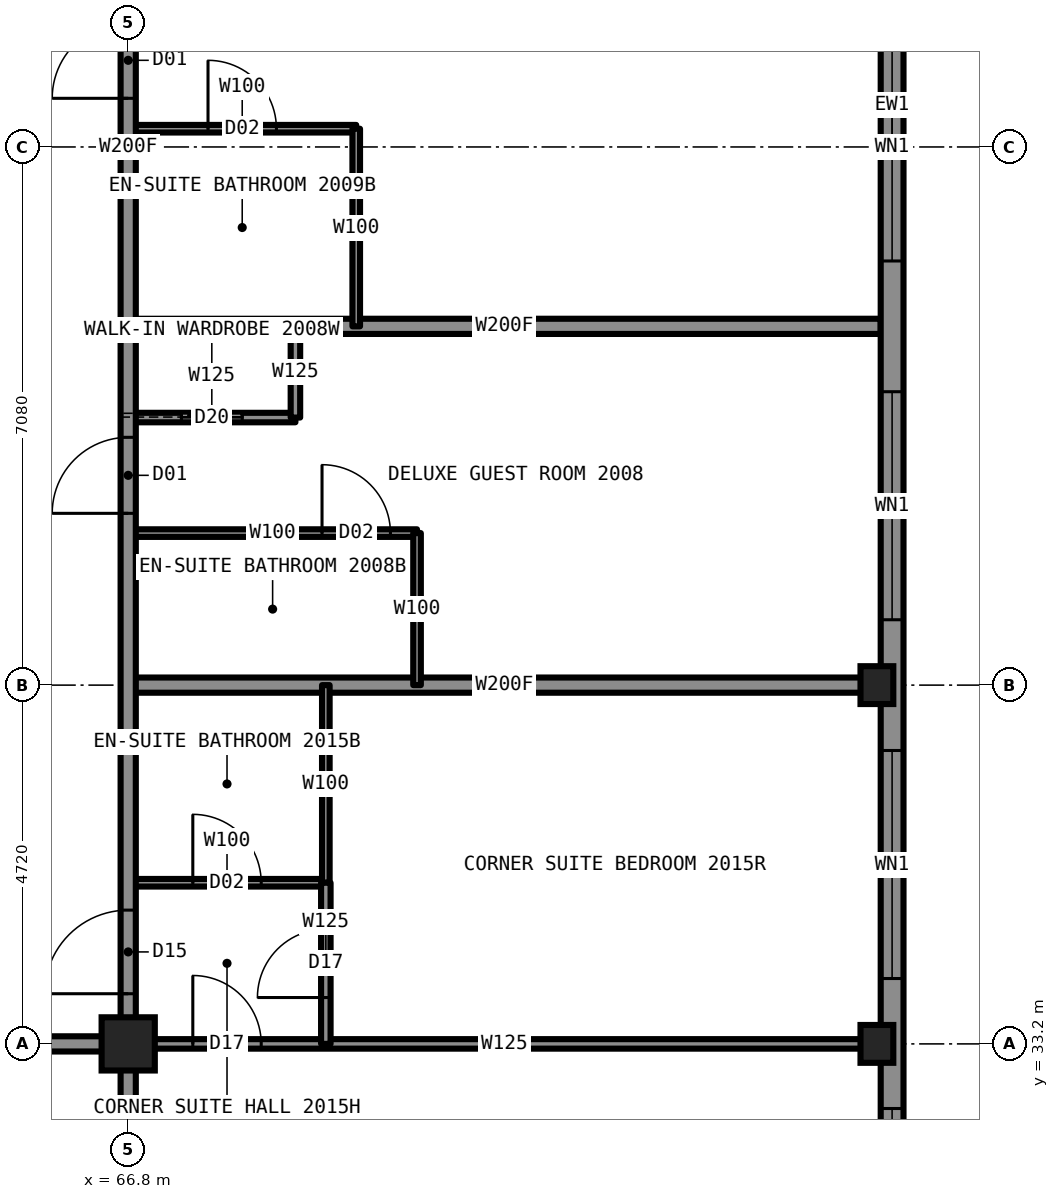
"""IFC4 building model, lengths in metres.
Left out: names, types, materials, properties, quantities, classifications, styles, units other than length and angle.
Written with IfcOpenShell. Run it as: python <this file> out.ifc"""

import sys

from ifc_helpers import new_model, si_unit, direction, frame, frame_2d, origin, origin_2d, place, context, subcontext, project, spatial, rectangle, hollow_rectangle, i_section, extrude, element, fill, save


model = new_model("IFC4")
c1 = context("Model", 3, precision=1e-05, world=origin(), true_north=direction((0.0, 1.0)))
c2 = subcontext(c1, "Body", "Model", "MODEL_VIEW")
j1 = project(units=[si_unit("LENGTHUNIT", "METRE"), si_unit("PLANEANGLEUNIT", "RADIAN")], contexts=[c1])
p1 = place(None, origin())
s1 = spatial("IfcSite", under=j1, at=p1, CompositionType="ELEMENT")
p2 = place(p1, origin())
s2 = spatial("IfcBuilding", under=s1, at=p2, CompositionType="ELEMENT")
p3 = place(p2, frame((0.0, 0.0, 70.5)))
s3 = spatial("IfcBuildingStorey", under=s2, at=p3, CompositionType="ELEMENT", Elevation=70.5)
for number, where, z_axis, x_axis in (
    (1, (76.65, 33.2, 0.0), (0.0, 0.0, 1.0), (1.0, 0.0, 0.0)),
    (2, (76.65, 37.92, 0.0), (0.0, 0.0, 1.0), (1.0, 0.0, 0.0)),
):
    element("IfcColumn", number, at=place(p3, frame(where, z_axis=z_axis, x_axis=x_axis)), inside=s3, PredefinedType="COLUMN", context=c2, shape_type="SweptSolid", body=[
        extrude(i_section(OverallWidth=0.432, OverallDepth=0.498, WebThickness=0.056, FlangeThickness=0.089, at=origin_2d()), origin(), (0.0, 0.0, 1.0), 3.5),
    ])
p4 = place(p3, frame((66.8, 33.2, 0.0), z_axis=(0.0, 0.0, 1.0), x_axis=(1.0, 0.0, 0.0)))
e3 = element("IfcColumn", 3, at=p4, inside=s3, PredefinedType="COLUMN", context=c2, shape_type="SweptSolid", body=[
    extrude(hollow_rectangle(XDim=0.7, YDim=0.7, WallThickness=0.06, at=origin_2d()), origin(), (0.0, 0.0, 1.0), 3.5),
])
p5 = place(p3, frame((43.2, 33.2, 0.0), z_axis=(0.0, 0.0, 1.0), x_axis=(1.0, 0.0, 0.0)))
e4 = element("IfcWall", 4, at=p5, inside=s3, PredefinedType="PARTITIONING", context=c2, shape_type="SweptSolid", body=[
    extrude(rectangle(XDim=23.6, YDim=0.2, at=frame_2d((11.8, 0.0))), origin(), (0.0, 0.0, 1.0), 3.33),
])
p6 = place(p5, frame((2.55, 0.0, 0.0)))
e5 = element("IfcOpeningElement", 5, at=p6, cuts=e4, PredefinedType="OPENING", context=c2, shape_type="SweptSolid", body=[
    extrude(rectangle(XDim=1.0, YDim=2.2, at=frame_2d((0.5, 1.1))), frame((0.0, 0.11, 0.0), z_axis=(0.0, -1.0, 0.0), x_axis=(1.0, 0.0, 0.0)), (0.0, 0.0, 1.0), 0.22),
])
p7 = place(p5, frame((5.12, 0.0, 0.0)))
e6 = element("IfcOpeningElement", 6, at=p7, cuts=e4, PredefinedType="OPENING", context=c2, shape_type="SweptSolid", body=[
    extrude(rectangle(XDim=1.0, YDim=2.2, at=frame_2d((0.5, 1.1))), frame((0.0, 0.11, 0.0), z_axis=(0.0, -1.0, 0.0), x_axis=(1.0, 0.0, 0.0)), (0.0, 0.0, 1.0), 0.22),
])
p8 = place(p5, frame((11.7, 0.0, 0.0)))
e7 = element("IfcOpeningElement", 7, at=p8, cuts=e4, PredefinedType="OPENING", context=c2, shape_type="SweptSolid", body=[
    extrude(rectangle(XDim=1.0, YDim=2.2, at=frame_2d((0.5, 1.1))), frame((0.0, 0.11, 0.0), z_axis=(0.0, -1.0, 0.0), x_axis=(1.0, 0.0, 0.0)), (0.0, 0.0, 1.0), 0.22),
])
p9 = place(p5, frame((16.42, 0.0, 0.0)))
e8 = element("IfcOpeningElement", 8, at=p9, cuts=e4, PredefinedType="OPENING", context=c2, shape_type="SweptSolid", body=[
    extrude(rectangle(XDim=1.0, YDim=2.2, at=frame_2d((0.5, 1.1))), frame((0.0, 0.11, 0.0), z_axis=(0.0, -1.0, 0.0), x_axis=(1.0, 0.0, 0.0)), (0.0, 0.0, 1.0), 0.22),
])
p10 = place(p5, frame((21.43, 0.0, 0.0)))
e9 = element("IfcOpeningElement", 9, at=p10, cuts=e4, PredefinedType="OPENING", context=c2, shape_type="SweptSolid", body=[
    extrude(rectangle(XDim=1.0, YDim=2.2, at=frame_2d((0.5, 1.1))), frame((0.0, 0.11, 0.0), z_axis=(0.0, -1.0, 0.0), x_axis=(1.0, 0.0, 0.0)), (0.0, 0.0, 1.0), 0.22),
])
p11 = place(p3, frame((66.8, 33.2, 0.0), z_axis=(0.0, 0.0, 1.0), x_axis=(1.0, 0.0, 0.0)))
e10 = element("IfcWall", 10, at=p11, inside=s3, PredefinedType="PARTITIONING", context=c2, shape_type="SweptSolid", body=[
    extrude(rectangle(XDim=9.9, YDim=0.125, at=frame_2d((4.95, 0.0))), origin(), (0.0, 0.0, 1.0), 2.573),
])
p12 = place(p11, frame((0.85, 0.0, 0.0)))
e11 = element("IfcOpeningElement", 11, at=p12, cuts=e10, PredefinedType="OPENING", context=c2, shape_type="SweptSolid", body=[
    extrude(rectangle(XDim=0.9, YDim=2.2, at=frame_2d((0.45, 1.1))), frame((0.0, 0.073, 0.0), z_axis=(0.0, -1.0, 0.0), x_axis=(1.0, 0.0, 0.0)), (0.0, 0.0, 1.0), 0.145),
])
p13 = place(p3, frame((66.8, 42.64, 0.0), z_axis=(0.0, 0.0, 1.0), x_axis=(1.0, 0.0, 0.0)))
e12 = element("IfcWall", 12, at=p13, inside=s3, PredefinedType="PARTITIONING", context=c2, shape_type="SweptSolid", body=[
    extrude(rectangle(XDim=9.9, YDim=0.2, at=frame_2d((4.95, 0.0))), origin(), (0.0, 0.0, 1.0), 2.723),
])
p14 = place(p3, frame((66.8, 41.44, 0.0), z_axis=(0.0, 0.0, 1.0), x_axis=(1.0, 0.0, 0.0)))
e13 = element("IfcWall", 13, at=p14, inside=s3, PredefinedType="PARTITIONING", context=c2, shape_type="SweptSolid", body=[
    extrude(rectangle(XDim=2.2, YDim=0.125, at=frame_2d((1.1, 0.0))), origin(), (0.0, 0.0, 1.0), 3.33),
])
p15 = place(p14, frame((0.7, 0.0, 0.0)))
e14 = element("IfcOpeningElement", 14, at=p15, cuts=e13, PredefinedType="OPENING", context=c2, shape_type="SweptSolid", body=[
    extrude(rectangle(XDim=0.8, YDim=2.1, at=frame_2d((0.4, 1.05))), frame((0.0, 0.073, 0.0), z_axis=(0.0, -1.0, 0.0), x_axis=(1.0, 0.0, 0.0)), (0.0, 0.0, 1.0), 0.145),
])
p16 = place(p3, frame((66.8, 39.92, 0.0), z_axis=(0.0, 0.0, 1.0), x_axis=(1.0, 0.0, 0.0)))
e15 = element("IfcWall", 15, at=p16, inside=s3, PredefinedType="PARTITIONING", context=c2, shape_type="SweptSolid", body=[
    extrude(rectangle(XDim=3.8, YDim=0.1, at=frame_2d((1.9, 0.0))), origin(), (0.0, 0.0, 1.0), 3.33),
])
p17 = place(p16, frame((2.55, 0.0, 0.0)))
e16 = element("IfcOpeningElement", 16, at=p17, cuts=e15, PredefinedType="OPENING", context=c2, shape_type="SweptSolid", body=[
    extrude(rectangle(XDim=0.9, YDim=2.1, at=frame_2d((0.45, 1.05))), frame((0.0, 0.06, 0.0), z_axis=(0.0, -1.0, 0.0), x_axis=(1.0, 0.0, 0.0)), (0.0, 0.0, 1.0), 0.12),
])
p18 = place(p3, frame((66.8, 37.92, 0.0), z_axis=(0.0, 0.0, 1.0), x_axis=(1.0, 0.0, 0.0)))
e17 = element("IfcWall", 17, at=p18, inside=s3, PredefinedType="PARTITIONING", context=c2, shape_type="SweptSolid", body=[
    extrude(rectangle(XDim=9.9, YDim=0.2, at=frame_2d((4.95, 0.0))), origin(), (0.0, 0.0, 1.0), 2.573),
])
p19 = place(p3, frame((66.8, 35.32, 0.0), z_axis=(0.0, 0.0, 1.0), x_axis=(1.0, 0.0, 0.0)))
e18 = element("IfcWall", 18, at=p19, inside=s3, PredefinedType="PARTITIONING", context=c2, shape_type="SweptSolid", body=[
    extrude(rectangle(XDim=2.6, YDim=0.1, at=frame_2d((1.3, 0.0))), origin(), (0.0, 0.0, 1.0), 3.33),
])
p20 = place(p19, frame((0.85, 0.0, 0.0)))
e19 = element("IfcOpeningElement", 19, at=p20, cuts=e18, PredefinedType="OPENING", context=c2, shape_type="SweptSolid", body=[
    extrude(rectangle(XDim=0.9, YDim=2.1, at=frame_2d((0.45, 1.05))), frame((0.0, 0.06, 0.0), z_axis=(0.0, -1.0, 0.0), x_axis=(1.0, 0.0, 0.0)), (0.0, 0.0, 1.0), 0.12),
])
p21 = place(p3, frame((66.8, 45.24, 0.0), z_axis=(0.0, 0.0, 1.0), x_axis=(1.0, 0.0, 0.0)))
e20 = element("IfcWall", 20, at=p21, inside=s3, PredefinedType="PARTITIONING", context=c2, shape_type="SweptSolid", body=[
    extrude(rectangle(XDim=3.0, YDim=0.1, at=frame_2d((1.5, 0.0))), origin(), (0.0, 0.0, 1.0), 3.33),
])
p22 = place(p21, frame((1.05, 0.0, 0.0)))
e21 = element("IfcOpeningElement", 21, at=p22, cuts=e20, PredefinedType="OPENING", context=c2, shape_type="SweptSolid", body=[
    extrude(rectangle(XDim=0.9, YDim=2.1, at=frame_2d((0.45, 1.05))), frame((0.0, 0.06, 0.0), z_axis=(0.0, -1.0, 0.0), x_axis=(1.0, 0.0, 0.0)), (0.0, 0.0, 1.0), 0.12),
])
p23 = place(p3, frame((66.8, 33.2, 0.0), z_axis=(0.0, 0.0, 1.0), x_axis=(0.0, 1.0, 0.0)))
e22 = element("IfcWall", 22, at=p23, inside=s3, PredefinedType="PARTITIONING", context=c2, shape_type="SweptSolid", body=[
    extrude(rectangle(XDim=23.6, YDim=0.2, at=frame_2d((11.8, 0.0))), origin(), (0.0, 0.0, 1.0), 3.33),
])
p24 = place(p23, frame((6.98, 0.0, 0.0)))
e23 = element("IfcOpeningElement", 23, at=p24, cuts=e22, PredefinedType="OPENING", context=c2, shape_type="SweptSolid", body=[
    extrude(rectangle(XDim=1.0, YDim=2.2, at=frame_2d((0.5, 1.1))), frame((0.0, 0.11, 0.0), z_axis=(0.0, -1.0, 0.0), x_axis=(1.0, 0.0, 0.0)), (0.0, 0.0, 1.0), 0.22),
])
p25 = place(p23, frame((12.44, 0.0, 0.0)))
e24 = element("IfcOpeningElement", 24, at=p25, cuts=e22, PredefinedType="OPENING", context=c2, shape_type="SweptSolid", body=[
    extrude(rectangle(XDim=1.0, YDim=2.2, at=frame_2d((0.5, 1.1))), frame((0.0, 0.11, 0.0), z_axis=(0.0, -1.0, 0.0), x_axis=(1.0, 0.0, 0.0)), (0.0, 0.0, 1.0), 0.22),
])
p26 = place(p23, frame((21.85, 0.0, 0.0)))
e25 = element("IfcOpeningElement", 25, at=p26, cuts=e22, PredefinedType="OPENING", context=c2, shape_type="SweptSolid", body=[
    extrude(rectangle(XDim=1.1, YDim=2.2, at=frame_2d((0.55, 1.1))), frame((0.0, 0.11, 0.0), z_axis=(0.0, -1.0, 0.0), x_axis=(1.0, 0.0, 0.0)), (0.0, 0.0, 1.0), 0.22),
])
p27 = place(p23, frame((0.66, 0.0, 0.0)))
e26 = element("IfcOpeningElement", 26, at=p27, cuts=e22, PredefinedType="OPENING", context=c2, shape_type="SweptSolid", body=[
    extrude(rectangle(XDim=1.1, YDim=2.2, at=frame_2d((0.55, 1.1))), frame((0.0, 0.11, 0.0), z_axis=(0.0, -1.0, 0.0), x_axis=(1.0, 0.0, 0.0)), (0.0, 0.0, 1.0), 0.22),
])
p28 = place(p3, frame((66.8, 23.3, 0.0), z_axis=(0.0, 0.0, 1.0), x_axis=(0.0, 1.0, 0.0)))
e27 = element("IfcWall", 27, at=p28, inside=s3, PredefinedType="PARTITIONING", context=c2, shape_type="SweptSolid", body=[
    extrude(rectangle(XDim=9.9, YDim=0.2, at=frame_2d((4.95, 0.0))), origin(), (0.0, 0.0, 1.0), 2.573),
])
p29 = place(p3, frame((69.0, 41.44, 0.0), z_axis=(0.0, 0.0, 1.0), x_axis=(0.0, 1.0, 0.0)))
e28 = element("IfcWall", 28, at=p29, inside=s3, PredefinedType="PARTITIONING", context=c2, shape_type="SweptSolid", body=[
    extrude(rectangle(XDim=1.2, YDim=0.125, at=frame_2d((0.6, 0.0))), origin(), (0.0, 0.0, 1.0), 3.33),
])
p30 = place(p3, frame((69.4, 35.32, 0.0), z_axis=(0.0, 0.0, 1.0), x_axis=(0.0, 1.0, 0.0)))
e29 = element("IfcWall", 29, at=p30, inside=s3, PredefinedType="PARTITIONING", context=c2, shape_type="SweptSolid", body=[
    extrude(rectangle(XDim=2.6, YDim=0.1, at=frame_2d((1.3, 0.0))), origin(), (0.0, 0.0, 1.0), 3.33),
])
p31 = place(p3, frame((69.4, 33.2, 0.0), z_axis=(0.0, 0.0, 1.0), x_axis=(0.0, 1.0, 0.0)))
e30 = element("IfcWall", 30, at=p31, inside=s3, PredefinedType="PARTITIONING", context=c2, shape_type="SweptSolid", body=[
    extrude(rectangle(XDim=2.12, YDim=0.125, at=frame_2d((1.06, 0.0))), origin(), (0.0, 0.0, 1.0), 3.33),
])
p32 = place(p31, frame((0.61, 0.0, 0.0)))
e31 = element("IfcOpeningElement", 31, at=p32, cuts=e30, PredefinedType="OPENING", context=c2, shape_type="SweptSolid", body=[
    extrude(rectangle(XDim=0.9, YDim=2.2, at=frame_2d((0.45, 1.1))), frame((0.0, 0.073, 0.0), z_axis=(0.0, -1.0, 0.0), x_axis=(1.0, 0.0, 0.0)), (0.0, 0.0, 1.0), 0.145),
])
p33 = place(p3, frame((69.8, 42.64, 0.0), z_axis=(0.0, 0.0, 1.0), x_axis=(0.0, 1.0, 0.0)))
e32 = element("IfcWall", 32, at=p33, inside=s3, PredefinedType="PARTITIONING", context=c2, shape_type="SweptSolid", body=[
    extrude(rectangle(XDim=2.6, YDim=0.1, at=frame_2d((1.3, 0.0))), origin(), (0.0, 0.0, 1.0), 3.33),
])
p34 = place(p3, frame((70.6, 37.92, 0.0), z_axis=(0.0, 0.0, 1.0), x_axis=(0.0, 1.0, 0.0)))
e33 = element("IfcWall", 33, at=p34, inside=s3, PredefinedType="PARTITIONING", context=c2, shape_type="SweptSolid", body=[
    extrude(rectangle(XDim=2.0, YDim=0.1, at=frame_2d((1.0, 0.0))), origin(), (0.0, 0.0, 1.0), 3.33),
])
p35 = place(p3, frame((76.85, 28.5, 0.0), z_axis=(0.0, 0.0, 1.0), x_axis=(0.0, 1.0, 0.0)))
e34 = element("IfcWall", 34, at=p35, inside=s3, PredefinedType="SOLIDWALL", context=c2, shape_type="SweptSolid", body=[
    extrude(rectangle(XDim=33.0, YDim=0.3, at=frame_2d((16.5, 0.0))), origin(), (0.0, 0.0, 1.0), 2.83),
])
p36 = place(p35, frame((0.85, 0.0, 0.5)))
e35 = element("IfcOpeningElement", 35, at=p36, cuts=e34, PredefinedType="OPENING", context=c2, shape_type="SweptSolid", body=[
    extrude(rectangle(XDim=2.9, YDim=2.0, at=frame_2d((1.45, 1.0))), frame((0.0, 0.16, 0.0), z_axis=(0.0, -1.0, 0.0), x_axis=(1.0, 0.0, 0.0)), (0.0, 0.0, 1.0), 0.32),
])
p37 = place(p35, frame((6.96, 0.0, 0.55)))
e36 = element("IfcOpeningElement", 36, at=p37, cuts=e34, PredefinedType="OPENING", context=c2, shape_type="SweptSolid", body=[
    extrude(rectangle(XDim=1.6, YDim=1.9, at=frame_2d((0.8, 0.95))), frame((0.0, 0.16, 0.0), z_axis=(0.0, -1.0, 0.0), x_axis=(1.0, 0.0, 0.0)), (0.0, 0.0, 1.0), 0.32),
])
p38 = place(p35, frame((10.28, 0.0, 0.5)))
e37 = element("IfcOpeningElement", 37, at=p38, cuts=e34, PredefinedType="OPENING", context=c2, shape_type="SweptSolid", body=[
    extrude(rectangle(XDim=3.0, YDim=2.0, at=frame_2d((1.5, 1.0))), frame((0.0, 0.16, 0.0), z_axis=(0.0, -1.0, 0.0), x_axis=(1.0, 0.0, 0.0)), (0.0, 0.0, 1.0), 0.32),
])
p39 = place(p35, frame((15.0, 0.0, 0.5)))
e38 = element("IfcOpeningElement", 38, at=p39, cuts=e34, PredefinedType="OPENING", context=c2, shape_type="SweptSolid", body=[
    extrude(rectangle(XDim=3.0, YDim=2.0, at=frame_2d((1.5, 1.0))), frame((0.0, 0.16, 0.0), z_axis=(0.0, -1.0, 0.0), x_axis=(1.0, 0.0, 0.0)), (0.0, 0.0, 1.0), 0.32),
])
p40 = place(p35, frame((19.72, 0.0, 0.5)))
e39 = element("IfcOpeningElement", 39, at=p40, cuts=e34, PredefinedType="OPENING", context=c2, shape_type="SweptSolid", body=[
    extrude(rectangle(XDim=3.0, YDim=2.0, at=frame_2d((1.5, 1.0))), frame((0.0, 0.16, 0.0), z_axis=(0.0, -1.0, 0.0), x_axis=(1.0, 0.0, 0.0)), (0.0, 0.0, 1.0), 0.32),
])
p41 = place(p35, frame((24.44, 0.0, 0.55)))
e40 = element("IfcOpeningElement", 40, at=p41, cuts=e34, PredefinedType="OPENING", context=c2, shape_type="SweptSolid", body=[
    extrude(rectangle(XDim=1.6, YDim=1.9, at=frame_2d((0.8, 0.95))), frame((0.0, 0.16, 0.0), z_axis=(0.0, -1.0, 0.0), x_axis=(1.0, 0.0, 0.0)), (0.0, 0.0, 1.0), 0.32),
])
p42 = place(p35, frame((29.25, 0.0, 0.5)))
e41 = element("IfcOpeningElement", 41, at=p42, cuts=e34, PredefinedType="OPENING", context=c2, shape_type="SweptSolid", body=[
    extrude(rectangle(XDim=2.9, YDim=2.0, at=frame_2d((1.45, 1.0))), frame((0.0, 0.16, 0.0), z_axis=(0.0, -1.0, 0.0), x_axis=(1.0, 0.0, 0.0)), (0.0, 0.0, 1.0), 0.32),
])
p43 = place(p35, frame((6.31, 0.0, 1.45)))
e42 = element("IfcOpeningElement", 42, at=p43, cuts=e34, PredefinedType="OPENING", context=c2, shape_type="SweptSolid", body=[
    extrude(rectangle(XDim=0.6, YDim=1.0, at=frame_2d((0.3, 0.5))), frame((0.0, 0.16, 0.0), z_axis=(0.0, -1.0, 0.0), x_axis=(1.0, 0.0, 0.0)), (0.0, 0.0, 1.0), 0.32),
])
p44 = place(p35, frame((26.04, 0.0, 1.45)))
e43 = element("IfcOpeningElement", 43, at=p44, cuts=e34, PredefinedType="OPENING", context=c2, shape_type="SweptSolid", body=[
    extrude(rectangle(XDim=0.6, YDim=1.0, at=frame_2d((0.3, 0.5))), frame((0.0, 0.16, 0.0), z_axis=(0.0, -1.0, 0.0), x_axis=(1.0, 0.0, 0.0)), (0.0, 0.0, 1.0), 0.32),
])
p45 = place(p24, origin())
e44 = element("IfcDoor", 44, at=p45, inside=s3, OperationType="SINGLE_SWING_LEFT", PredefinedType="DOOR", context=c2, shape_type="SweptSolid", body=[
    extrude(rectangle(XDim=1.0, YDim=2.2, at=frame_2d((0.5, 1.1))), frame((0.0, 0.025, 0.0), z_axis=(0.0, -1.0, 0.0), x_axis=(1.0, 0.0, 0.0)), (0.0, 0.0, 1.0), 0.05),
])
fill(e23, e44)
p46 = place(p17, origin())
e45 = element("IfcDoor", 45, at=p46, inside=s3, OperationType="SINGLE_SWING_RIGHT", PredefinedType="DOOR", context=c2, shape_type="SweptSolid", body=[
    extrude(rectangle(XDim=0.9, YDim=2.1, at=frame_2d((0.45, 1.05))), frame((0.0, 0.025, 0.0), z_axis=(0.0, -1.0, 0.0), x_axis=(1.0, 0.0, 0.0)), (0.0, 0.0, 1.0), 0.05),
])
fill(e16, e45)
p47 = place(p15, origin())
e46 = element("IfcDoor", 46, at=p47, inside=s3, OperationType="SLIDING_TO_LEFT", PredefinedType="DOOR", context=c2, shape_type="SweptSolid", body=[
    extrude(rectangle(XDim=0.8, YDim=2.1, at=frame_2d((0.4, 1.05))), frame((0.0, 0.025, 0.0), z_axis=(0.0, -1.0, 0.0), x_axis=(1.0, 0.0, 0.0)), (0.0, 0.0, 1.0), 0.05),
])
fill(e14, e46)
p48 = place(p25, origin())
e47 = element("IfcDoor", 47, at=p48, inside=s3, OperationType="SINGLE_SWING_LEFT", PredefinedType="DOOR", context=c2, shape_type="SweptSolid", body=[
    extrude(rectangle(XDim=1.0, YDim=2.2, at=frame_2d((0.5, 1.1))), frame((0.0, 0.025, 0.0), z_axis=(0.0, -1.0, 0.0), x_axis=(1.0, 0.0, 0.0)), (0.0, 0.0, 1.0), 0.05),
])
fill(e24, e47)
p49 = place(p22, origin())
e48 = element("IfcDoor", 48, at=p49, inside=s3, OperationType="SINGLE_SWING_RIGHT", PredefinedType="DOOR", context=c2, shape_type="SweptSolid", body=[
    extrude(rectangle(XDim=0.9, YDim=2.1, at=frame_2d((0.45, 1.05))), frame((0.0, 0.025, 0.0), z_axis=(0.0, -1.0, 0.0), x_axis=(1.0, 0.0, 0.0)), (0.0, 0.0, 1.0), 0.05),
])
fill(e21, e48)
p50 = place(p12, origin())
e49 = element("IfcDoor", 49, at=p50, inside=s3, OperationType="SINGLE_SWING_LEFT", PredefinedType="DOOR", context=c2, shape_type="SweptSolid", body=[
    extrude(rectangle(XDim=0.9, YDim=2.2, at=frame_2d((0.45, 1.1))), frame((0.0, 0.025, 0.0), z_axis=(0.0, -1.0, 0.0), x_axis=(1.0, 0.0, 0.0)), (0.0, 0.0, 1.0), 0.05),
])
fill(e11, e49)
p51 = place(p20, origin())
e50 = element("IfcDoor", 50, at=p51, inside=s3, OperationType="SINGLE_SWING_RIGHT", PredefinedType="DOOR", context=c2, shape_type="SweptSolid", body=[
    extrude(rectangle(XDim=0.9, YDim=2.1, at=frame_2d((0.45, 1.05))), frame((0.0, 0.025, 0.0), z_axis=(0.0, -1.0, 0.0), x_axis=(1.0, 0.0, 0.0)), (0.0, 0.0, 1.0), 0.05),
])
fill(e19, e50)
p52 = place(p27, origin())
e51 = element("IfcDoor", 51, at=p52, inside=s3, OperationType="SINGLE_SWING_LEFT", PredefinedType="DOOR", context=c2, shape_type="SweptSolid", body=[
    extrude(rectangle(XDim=1.1, YDim=2.2, at=frame_2d((0.55, 1.1))), frame((0.0, 0.025, 0.0), z_axis=(0.0, -1.0, 0.0), x_axis=(1.0, 0.0, 0.0)), (0.0, 0.0, 1.0), 0.05),
])
fill(e26, e51)
p53 = place(p32, origin())
e52 = element("IfcDoor", 52, at=p53, inside=s3, OperationType="SINGLE_SWING_LEFT", PredefinedType="DOOR", context=c2, shape_type="SweptSolid", body=[
    extrude(rectangle(XDim=0.9, YDim=2.2, at=frame_2d((0.45, 1.1))), frame((0.0, 0.025, 0.0), z_axis=(0.0, -1.0, 0.0), x_axis=(1.0, 0.0, 0.0)), (0.0, 0.0, 1.0), 0.05),
])
fill(e31, e52)
p54 = place(p36, origin())
e53 = element("IfcWindow", 53, at=p54, inside=s3, PartitioningType="SINGLE_PANEL", PredefinedType="WINDOW", context=c2, shape_type="SweptSolid", body=[
    extrude(rectangle(XDim=2.9, YDim=2.0, at=frame_2d((1.45, 1.0))), frame((0.0, 0.03, 0.0), z_axis=(0.0, -1.0, 0.0), x_axis=(1.0, 0.0, 0.0)), (0.0, 0.0, 1.0), 0.06),
])
fill(e35, e53)
p55 = place(p37, origin())
e54 = element("IfcWindow", 54, at=p55, inside=s3, PartitioningType="SINGLE_PANEL", PredefinedType="WINDOW", context=c2, shape_type="SweptSolid", body=[
    extrude(rectangle(XDim=1.6, YDim=1.9, at=frame_2d((0.8, 0.95))), frame((0.0, 0.03, 0.0), z_axis=(0.0, -1.0, 0.0), x_axis=(1.0, 0.0, 0.0)), (0.0, 0.0, 1.0), 0.06),
])
fill(e36, e54)
p56 = place(p38, origin())
e55 = element("IfcWindow", 55, at=p56, inside=s3, PartitioningType="SINGLE_PANEL", PredefinedType="WINDOW", context=c2, shape_type="SweptSolid", body=[
    extrude(rectangle(XDim=3.0, YDim=2.0, at=frame_2d((1.5, 1.0))), frame((0.0, 0.03, 0.0), z_axis=(0.0, -1.0, 0.0), x_axis=(1.0, 0.0, 0.0)), (0.0, 0.0, 1.0), 0.06),
])
fill(e37, e55)
p57 = place(p39, origin())
e56 = element("IfcWindow", 56, at=p57, inside=s3, PartitioningType="SINGLE_PANEL", PredefinedType="WINDOW", context=c2, shape_type="SweptSolid", body=[
    extrude(rectangle(XDim=3.0, YDim=2.0, at=frame_2d((1.5, 1.0))), frame((0.0, 0.03, 0.0), z_axis=(0.0, -1.0, 0.0), x_axis=(1.0, 0.0, 0.0)), (0.0, 0.0, 1.0), 0.06),
])
fill(e38, e56)
p58 = place(p43, origin())
e57 = element("IfcWindow", 57, at=p58, inside=s3, PartitioningType="SINGLE_PANEL", PredefinedType="WINDOW", context=c2, shape_type="SweptSolid", body=[
    extrude(rectangle(XDim=0.6, YDim=1.0, at=frame_2d((0.3, 0.5))), frame((0.0, 0.03, 0.0), z_axis=(0.0, -1.0, 0.0), x_axis=(1.0, 0.0, 0.0)), (0.0, 0.0, 1.0), 0.06),
])
fill(e42, e57)
save(model, sys.argv[1])
